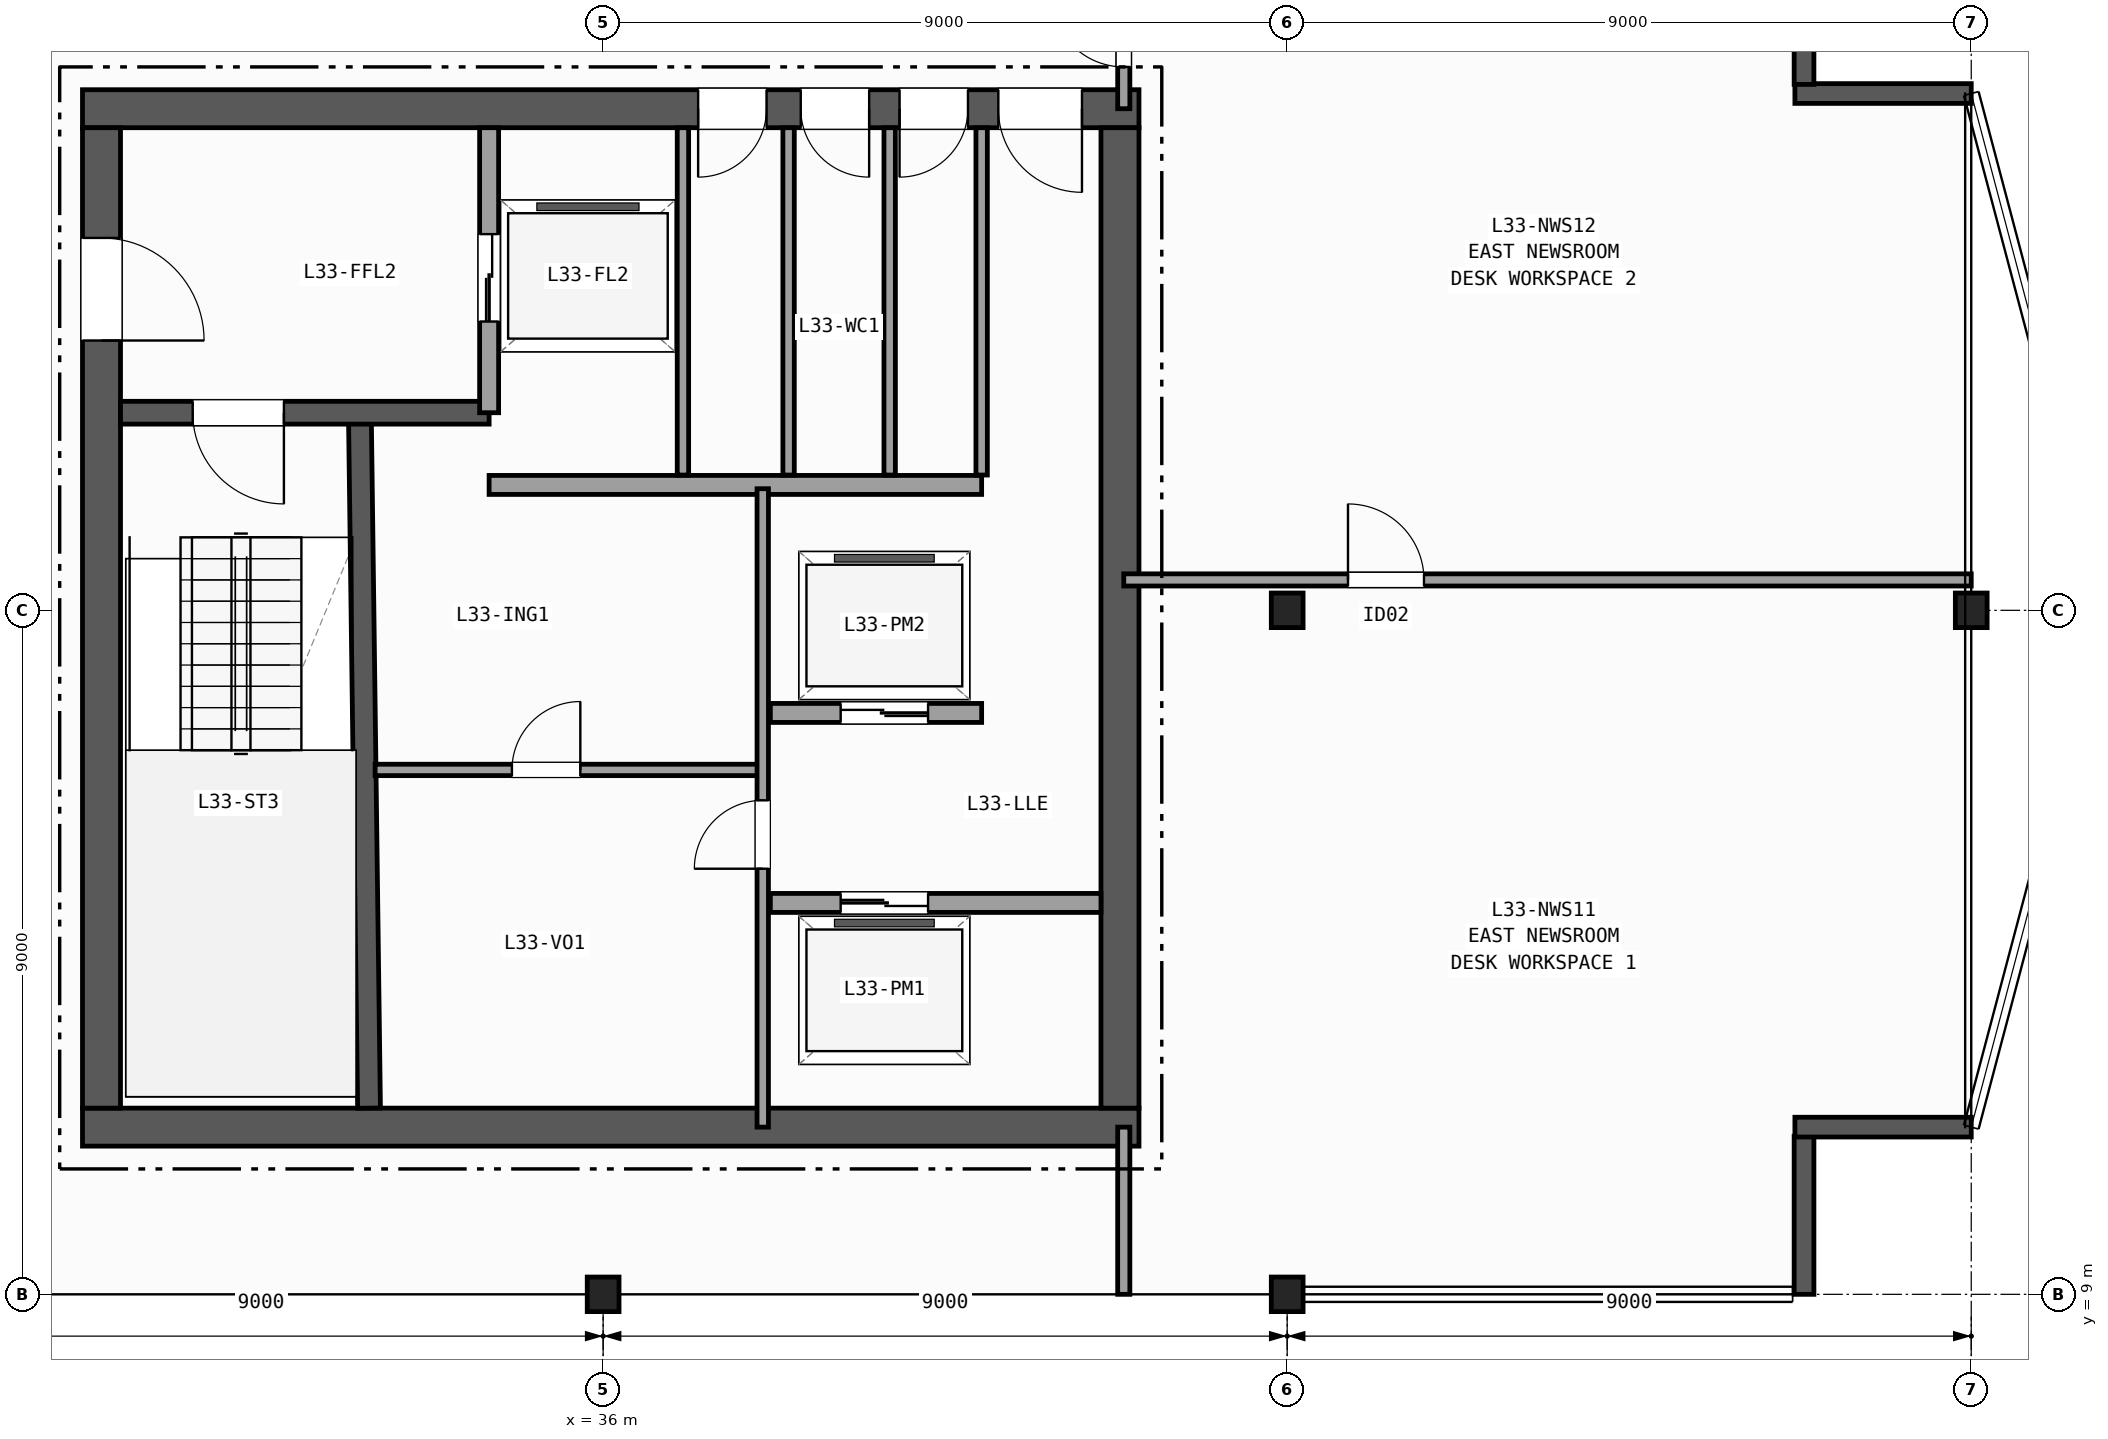
"""IFC4 building model, lengths in metres.
Left out: names, types, materials, properties, quantities, classifications, styles, units other than length and angle.
Written with IfcOpenShell. Run it as: python <this file> out.ifc"""

import sys

from ifc_helpers import new_model, si_unit, direction, frame, frame_2d, origin, origin_2d, place, context, subcontext, project, spatial, rectangle, i_section, extrude, element, fill, save


model = new_model("IFC4")
c1 = context("Model", 3, precision=1e-05, world=origin(), true_north=direction((0.0, 1.0)))
c2 = subcontext(c1, "Body", "Model", "MODEL_VIEW")
j1 = project(units=[si_unit("LENGTHUNIT", "METRE"), si_unit("PLANEANGLEUNIT", "RADIAN")], contexts=[c1])
p1 = place(None, origin())
s1 = spatial("IfcSite", under=j1, at=p1, CompositionType="ELEMENT")
p2 = place(p1, origin())
s2 = spatial("IfcBuilding", under=s1, at=p2, CompositionType="ELEMENT")
p3 = place(p2, frame((0.0, 0.0, 135.9)))
s3 = spatial("IfcBuildingStorey", under=s2, at=p3, CompositionType="ELEMENT", Elevation=135.9)
for number, where, z_axis, x_axis in (
    (1, (36.0, 9.0, 0.0), (0.0, 0.0, 1.0), (1.0, 0.0, 0.0)),
    (2, (45.0, 9.0, 0.0), (0.0, 0.0, 1.0), (1.0, 0.0, 0.0)),
    (3, (45.0, 18.0, 0.0), (0.0, 0.0, 1.0), (1.0, 0.0, 0.0)),
    (4, (54.0, 18.0, 0.0), (0.0, 0.0, 1.0), (1.0, 0.0, 0.0)),
):
    element("IfcColumn", number, at=place(p3, frame(where, z_axis=z_axis, x_axis=x_axis)), inside=s3, PredefinedType="COLUMN", context=c2, shape_type="SweptSolid", body=[
        extrude(i_section(OverallWidth=0.418, OverallDepth=0.455, WebThickness=0.042, FlangeThickness=0.068, FilletRadius=0.015, at=origin_2d()), origin(), (0.0, 0.0, 1.0), 3.7),
    ])
p4 = place(p3, frame((51.8, 9.0, 0.0), z_axis=(0.0, 0.0, 1.0), x_axis=(0.0, 1.0, 0.0)))
e5 = element("IfcWall", 5, at=p4, inside=s3, PredefinedType="SOLIDWALL", context=c2, shape_type="SweptSolid", body=[
    extrude(rectangle(XDim=2.08, YDim=0.26, at=frame_2d((1.04, 0.0))), origin(), (0.0, 0.0, 1.0), 3.42),
])
for number, where, z_axis, x_axis in (
    (6, (51.68, 11.2, 0.0), (0.0, 0.0, 1.0), (1.0, 0.0, 0.0)),
    (7, (54.0, 24.8, 0.0), (0.0, 0.0, 1.0), (-1.0, 0.0, 0.0)),
):
    element("IfcWall", number, at=place(p3, frame(where, z_axis=z_axis, x_axis=x_axis)), inside=s3, PredefinedType="SOLIDWALL", context=c2, shape_type="SweptSolid", body=[
        extrude(rectangle(XDim=2.32, YDim=0.26, at=frame_2d((1.16, 0.0))), origin(), (0.0, 0.0, 1.0), 3.42),
    ])
p5 = place(p3, frame((51.8, 24.92, 0.0), z_axis=(0.0, 0.0, 1.0), x_axis=(0.0, 1.0, 0.0)))
e8 = element("IfcWall", 8, at=p5, inside=s3, PredefinedType="SOLIDWALL", context=c2, shape_type="SweptSolid", body=[
    extrude(rectangle(XDim=2.08, YDim=0.26, at=frame_2d((1.04, 0.0))), origin(), (0.0, 0.0, 1.0), 3.42),
])
p6 = place(p3, frame((29.15, 11.2, 0.0), z_axis=(0.0, 0.0, 1.0), x_axis=(1.0, 0.0, 0.0)))
e9 = element("IfcWall", 9, at=p6, inside=s3, PredefinedType="SHEAR", context=c2, shape_type="SweptSolid", body=[
    extrude(rectangle(XDim=13.9, YDim=0.5, at=frame_2d((6.95, 0.0))), origin(), (0.0, 0.0, 1.0), 3.42),
])
p7 = place(p3, frame((43.05, 24.6, 0.0), z_axis=(0.0, 0.0, 1.0), x_axis=(-1.0, 0.0, 0.0)))
e10 = element("IfcWall", 10, at=p7, inside=s3, PredefinedType="SHEAR", context=c2, shape_type="SweptSolid", body=[
    extrude(rectangle(XDim=13.9, YDim=0.5, at=frame_2d((6.95, 0.0))), origin(), (0.0, 0.0, 1.0), 3.42),
])
p8 = place(p7, frame((0.75, 0.0, 0.0)))
e11 = element("IfcOpeningElement", 11, at=p8, cuts=e10, PredefinedType="OPENING", context=c2, shape_type="SweptSolid", body=[
    extrude(rectangle(XDim=1.1, YDim=2.15, at=frame_2d((0.55, 1.075))), frame((0.0, 0.26, 0.0), z_axis=(0.0, -1.0, 0.0), x_axis=(1.0, 0.0, 0.0)), (0.0, 0.0, 1.0), 0.52),
])
p9 = place(p7, frame((2.25, 0.0, 0.0)))
e12 = element("IfcOpeningElement", 12, at=p9, cuts=e10, PredefinedType="OPENING", context=c2, shape_type="SweptSolid", body=[
    extrude(rectangle(XDim=0.9, YDim=2.1, at=frame_2d((0.45, 1.05))), frame((0.0, 0.26, 0.0), z_axis=(0.0, -1.0, 0.0), x_axis=(1.0, 0.0, 0.0)), (0.0, 0.0, 1.0), 0.52),
])
p10 = place(p7, frame((3.55, 0.0, 0.0)))
e13 = element("IfcOpeningElement", 13, at=p10, cuts=e10, PredefinedType="OPENING", context=c2, shape_type="SweptSolid", body=[
    extrude(rectangle(XDim=0.9, YDim=2.1, at=frame_2d((0.45, 1.05))), frame((0.0, 0.26, 0.0), z_axis=(0.0, -1.0, 0.0), x_axis=(1.0, 0.0, 0.0)), (0.0, 0.0, 1.0), 0.52),
])
p11 = place(p7, frame((4.9, 0.0, 0.0)))
e14 = element("IfcOpeningElement", 14, at=p11, cuts=e10, PredefinedType="OPENING", context=c2, shape_type="SweptSolid", body=[
    extrude(rectangle(XDim=0.9, YDim=2.1, at=frame_2d((0.45, 1.05))), frame((0.0, 0.26, 0.0), z_axis=(0.0, -1.0, 0.0), x_axis=(1.0, 0.0, 0.0)), (0.0, 0.0, 1.0), 0.52),
])
p12 = place(p3, frame((29.4, 24.35, 0.0), z_axis=(0.0, 0.0, 1.0), x_axis=(0.0, -1.0, 0.0)))
e15 = element("IfcWall", 15, at=p12, inside=s3, PredefinedType="SHEAR", context=c2, shape_type="SweptSolid", body=[
    extrude(rectangle(XDim=12.9, YDim=0.5, at=frame_2d((6.45, 0.0))), origin(), (0.0, 0.0, 1.0), 3.42),
])
p13 = place(p12, frame((1.45, 0.0, 0.0)))
e16 = element("IfcOpeningElement", 16, at=p13, cuts=e15, PredefinedType="OPENING", context=c2, shape_type="SweptSolid", body=[
    extrude(rectangle(XDim=1.35, YDim=2.15, at=frame_2d((0.675, 1.075))), frame((0.0, 0.26, 0.0), z_axis=(0.0, -1.0, 0.0), x_axis=(1.0, 0.0, 0.0)), (0.0, 0.0, 1.0), 0.52),
])
p14 = place(p3, frame((42.8, 11.45, 0.0), z_axis=(0.0, 0.0, 1.0), x_axis=(0.0, 1.0, 0.0)))
e17 = element("IfcWall", 17, at=p14, inside=s3, PredefinedType="SHEAR", context=c2, shape_type="SweptSolid", body=[
    extrude(rectangle(XDim=12.9, YDim=0.5, at=frame_2d((6.45, 0.0))), origin(), (0.0, 0.0, 1.0), 3.42),
])
p15 = place(p3, frame((32.92, 11.45, 0.0), z_axis=(0.0, 0.0, 1.0), x_axis=(-0.013171578211, 0.999913251001, 0.0)))
e18 = element("IfcWall", 18, at=p15, inside=s3, PredefinedType="SHEAR", context=c2, shape_type="SweptSolid", body=[
    extrude(rectangle(XDim=9.101, YDim=0.3, at=frame_2d((4.55, 0.0))), origin(), (0.0, 0.0, 1.0), 3.42),
])
p16 = place(p3, frame((34.5, 20.6, 0.0), z_axis=(0.0, 0.0, 1.0), x_axis=(-1.0, 0.0, 0.0)))
e19 = element("IfcWall", 19, at=p16, inside=s3, PredefinedType="SHEAR", context=c2, shape_type="SweptSolid", body=[
    extrude(rectangle(XDim=4.85, YDim=0.3, at=frame_2d((2.425, 0.0))), origin(), (0.0, 0.0, 1.0), 3.42),
])
p17 = place(p16, frame((2.7, 0.0, 0.0)))
e20 = element("IfcOpeningElement", 20, at=p17, cuts=e19, PredefinedType="OPENING", context=c2, shape_type="SweptSolid", body=[
    extrude(rectangle(XDim=1.2, YDim=2.15, at=frame_2d((0.6, 1.075))), frame((0.0, 0.16, 0.0), z_axis=(0.0, -1.0, 0.0), x_axis=(1.0, 0.0, 0.0)), (0.0, 0.0, 1.0), 0.32),
])
p18 = place(p3, frame((34.5, 20.6, 0.0), z_axis=(0.0, 0.0, 1.0), x_axis=(0.0, 1.0, 0.0)))
e21 = element("IfcWall", 21, at=p18, inside=s3, PredefinedType="PARTITIONING", context=c2, shape_type="SweptSolid", body=[
    extrude(rectangle(XDim=3.75, YDim=0.25, at=frame_2d((1.875, 0.0))), origin(), (0.0, 0.0, 1.0), 3.42),
])
p19 = place(p18, frame((1.2, 0.0, 0.0)))
e22 = element("IfcOpeningElement", 22, at=p19, cuts=e21, PredefinedType="OPENING", context=c2, shape_type="SweptSolid", body=[
    extrude(rectangle(XDim=1.15, YDim=2.15, at=frame_2d((0.575, 1.075))), frame((0.0, 0.135, 0.0), z_axis=(0.0, -1.0, 0.0), x_axis=(1.0, 0.0, 0.0)), (0.0, 0.0, 1.0), 0.27),
])
p20 = place(p3, frame((34.5, 19.65, 0.0), z_axis=(0.0, 0.0, 1.0), x_axis=(1.0, 0.0, 0.0)))
e23 = element("IfcWall", 23, at=p20, inside=s3, PredefinedType="PARTITIONING", context=c2, shape_type="SweptSolid", body=[
    extrude(rectangle(XDim=6.48, YDim=0.25, at=frame_2d((3.24, 0.0))), origin(), (0.0, 0.0, 1.0), 3.42),
])
p21 = place(p3, frame((38.2, 14.15, 0.0), z_axis=(0.0, 0.0, 1.0), x_axis=(1.0, 0.0, 0.0)))
e24 = element("IfcWall", 24, at=p21, inside=s3, PredefinedType="PARTITIONING", context=c2, shape_type="SweptSolid", body=[
    extrude(rectangle(XDim=4.35, YDim=0.25, at=frame_2d((2.175, 0.0))), origin(), (0.0, 0.0, 1.0), 3.42),
])
p22 = place(p21, frame((0.925, 0.0, 0.0)))
e25 = element("IfcOpeningElement", 25, at=p22, cuts=e24, PredefinedType="OPENING", context=c2, shape_type="SweptSolid", body=[
    extrude(rectangle(XDim=1.15, YDim=2.15, at=frame_2d((0.575, 1.075))), frame((0.0, 0.135, 0.0), z_axis=(0.0, -1.0, 0.0), x_axis=(1.0, 0.0, 0.0)), (0.0, 0.0, 1.0), 0.27),
])
p23 = place(p3, frame((40.98, 16.65, 0.0), z_axis=(0.0, 0.0, 1.0), x_axis=(-1.0, 0.0, 0.0)))
e26 = element("IfcWall", 26, at=p23, inside=s3, PredefinedType="PARTITIONING", context=c2, shape_type="SweptSolid", body=[
    extrude(rectangle(XDim=2.78, YDim=0.25, at=frame_2d((1.39, 0.0))), origin(), (0.0, 0.0, 1.0), 3.42),
])
p24 = place(p23, frame((0.705, 0.0, 0.0)))
e27 = element("IfcOpeningElement", 27, at=p24, cuts=e26, PredefinedType="OPENING", context=c2, shape_type="SweptSolid", body=[
    extrude(rectangle(XDim=1.15, YDim=2.15, at=frame_2d((0.575, 1.075))), frame((0.0, 0.135, 0.0), z_axis=(0.0, -1.0, 0.0), x_axis=(1.0, 0.0, 0.0)), (0.0, 0.0, 1.0), 0.27),
])
p25 = place(p3, frame((33.0, 15.9, 0.0), z_axis=(0.0, 0.0, 1.0), x_axis=(1.0, 0.0, 0.0)))
e28 = element("IfcWall", 28, at=p25, inside=s3, PredefinedType="PARTITIONING", context=c2, shape_type="SweptSolid", body=[
    extrude(rectangle(XDim=5.1, YDim=0.15, at=frame_2d((2.55, 0.0))), origin(), (0.0, 0.0, 1.0), 3.42),
])
p26 = place(p25, frame((1.8, 0.0, 0.0)))
e29 = element("IfcOpeningElement", 29, at=p26, cuts=e28, PredefinedType="OPENING", context=c2, shape_type="SweptSolid", body=[
    extrude(rectangle(XDim=0.9, YDim=2.1, at=frame_2d((0.45, 1.05))), frame((0.0, 0.085, 0.0), z_axis=(0.0, -1.0, 0.0), x_axis=(1.0, 0.0, 0.0)), (0.0, 0.0, 1.0), 0.17),
])
p27 = place(p3, frame((38.1, 11.2, 0.0), z_axis=(0.0, 0.0, 1.0), x_axis=(0.0, 1.0, 0.0)))
e30 = element("IfcWall", 30, at=p27, inside=s3, PredefinedType="PARTITIONING", context=c2, shape_type="SweptSolid", body=[
    extrude(rectangle(XDim=8.4, YDim=0.15, at=frame_2d((4.2, 0.0))), origin(), (0.0, 0.0, 1.0), 3.42),
])
p28 = place(p27, frame((3.4, 0.0, 0.0)))
e31 = element("IfcOpeningElement", 31, at=p28, cuts=e30, PredefinedType="OPENING", context=c2, shape_type="SweptSolid", body=[
    extrude(rectangle(XDim=0.9, YDim=2.1, at=frame_2d((0.45, 1.05))), frame((0.0, 0.085, 0.0), z_axis=(0.0, -1.0, 0.0), x_axis=(1.0, 0.0, 0.0)), (0.0, 0.0, 1.0), 0.17),
])
for number, where, z_axis, x_axis in (
    (32, (37.05, 19.78, 0.0), (0.0, 0.0, 1.0), (0.0, 1.0, 0.0)),
    (33, (38.44, 19.78, 0.0), (0.0, 0.0, 1.0), (0.0, 1.0, 0.0)),
    (34, (39.77, 19.78, 0.0), (0.0, 0.0, 1.0), (0.0, 1.0, 0.0)),
    (35, (40.98, 19.78, 0.0), (0.0, 0.0, 1.0), (0.0, 1.0, 0.0)),
):
    element("IfcWall", number, at=place(p3, frame(where, z_axis=z_axis, x_axis=x_axis)), inside=s3, PredefinedType="PARTITIONING", context=c2, shape_type="SweptSolid", body=[
        extrude(rectangle(XDim=4.57, YDim=0.15, at=frame_2d((2.285, 0.0))), origin(), (0.0, 0.0, 1.0), 3.42),
    ])
p29 = place(p3, frame((42.85, 9.0, 0.0), z_axis=(0.0, 0.0, 1.0), x_axis=(0.0, 1.0, 0.0)))
e36 = element("IfcWall", 36, at=p29, inside=s3, PredefinedType="PARTITIONING", context=c2, shape_type="SweptSolid", body=[
    extrude(rectangle(XDim=2.2, YDim=0.16, at=frame_2d((1.1, 0.0))), origin(), (0.0, 0.0, 1.0), 2.634),
])
p30 = place(p3, frame((42.85, 24.6, 0.0), z_axis=(0.0, 0.0, 1.0), x_axis=(0.0, 1.0, 0.0)))
e37 = element("IfcWall", 37, at=p30, inside=s3, PredefinedType="PARTITIONING", context=c2, shape_type="SweptSolid", body=[
    extrude(rectangle(XDim=2.4, YDim=0.16, at=frame_2d((1.2, 0.0))), origin(), (0.0, 0.0, 1.0), 2.634),
])
p31 = place(p30, frame((0.55, 0.0, 0.0)))
e38 = element("IfcOpeningElement", 38, at=p31, cuts=e37, PredefinedType="OPENING", context=c2, shape_type="SweptSolid", body=[
    extrude(rectangle(XDim=0.95, YDim=2.1, at=frame_2d((0.475, 1.05))), frame((0.0, 0.09, 0.0), z_axis=(0.0, -1.0, 0.0), x_axis=(1.0, 0.0, 0.0)), (0.0, 0.0, 1.0), 0.18),
])
p32 = place(p3, frame((42.85, 18.4, 0.0), z_axis=(0.0, 0.0, 1.0), x_axis=(1.0, 0.0, 0.0)))
e39 = element("IfcWall", 39, at=p32, inside=s3, PredefinedType="PARTITIONING", context=c2, shape_type="SweptSolid", body=[
    extrude(rectangle(XDim=11.15, YDim=0.16, at=frame_2d((5.575, 0.0))), origin(), (0.0, 0.0, 1.0), 3.42),
])
p33 = place(p32, frame((2.95, 0.0, 0.0)))
e40 = element("IfcOpeningElement", 40, at=p33, cuts=e39, PredefinedType="OPENING", context=c2, shape_type="SweptSolid", body=[
    extrude(rectangle(XDim=1.0, YDim=2.1, at=frame_2d((0.5, 1.05))), frame((0.0, 0.09, 0.0), z_axis=(0.0, -1.0, 0.0), x_axis=(1.0, 0.0, 0.0)), (0.0, 0.0, 1.0), 0.18),
])
p34 = place(p17, origin())
e41 = element("IfcDoor", 41, at=p34, inside=s3, OperationType="SINGLE_SWING_LEFT", PredefinedType="DOOR", context=c2, shape_type="SweptSolid", body=[
    extrude(rectangle(XDim=1.2, YDim=2.15, at=frame_2d((0.6, 1.075))), frame((0.0, 0.025, 0.0), z_axis=(0.0, -1.0, 0.0), x_axis=(1.0, 0.0, 0.0)), (0.0, 0.0, 1.0), 0.05),
])
fill(e20, e41)
p35 = place(p13, origin())
e42 = element("IfcDoor", 42, at=p35, inside=s3, OperationType="SINGLE_SWING_RIGHT", PredefinedType="DOOR", context=c2, shape_type="SweptSolid", body=[
    extrude(rectangle(XDim=1.35, YDim=2.15, at=frame_2d((0.675, 1.075))), frame((0.0, 0.025, 0.0), z_axis=(0.0, -1.0, 0.0), x_axis=(1.0, 0.0, 0.0)), (0.0, 0.0, 1.0), 0.05),
])
fill(e16, e42)
p36 = place(p8, origin())
e43 = element("IfcDoor", 43, at=p36, inside=s3, OperationType="SINGLE_SWING_LEFT", PredefinedType="DOOR", context=c2, shape_type="SweptSolid", body=[
    extrude(rectangle(XDim=1.1, YDim=2.15, at=frame_2d((0.55, 1.075))), frame((0.0, 0.025, 0.0), z_axis=(0.0, -1.0, 0.0), x_axis=(1.0, 0.0, 0.0)), (0.0, 0.0, 1.0), 0.05),
])
fill(e11, e43)
p37 = place(p9, origin())
e44 = element("IfcDoor", 44, at=p37, inside=s3, OperationType="SINGLE_SWING_RIGHT", PredefinedType="DOOR", context=c2, shape_type="SweptSolid", body=[
    extrude(rectangle(XDim=0.9, YDim=2.1, at=frame_2d((0.45, 1.05))), frame((0.0, 0.025, 0.0), z_axis=(0.0, -1.0, 0.0), x_axis=(1.0, 0.0, 0.0)), (0.0, 0.0, 1.0), 0.05),
])
fill(e12, e44)
p38 = place(p10, origin())
e45 = element("IfcDoor", 45, at=p38, inside=s3, OperationType="SINGLE_SWING_LEFT", PredefinedType="DOOR", context=c2, shape_type="SweptSolid", body=[
    extrude(rectangle(XDim=0.9, YDim=2.1, at=frame_2d((0.45, 1.05))), frame((0.0, 0.025, 0.0), z_axis=(0.0, -1.0, 0.0), x_axis=(1.0, 0.0, 0.0)), (0.0, 0.0, 1.0), 0.05),
])
fill(e13, e45)
p39 = place(p11, origin())
e46 = element("IfcDoor", 46, at=p39, inside=s3, OperationType="SINGLE_SWING_RIGHT", PredefinedType="DOOR", context=c2, shape_type="SweptSolid", body=[
    extrude(rectangle(XDim=0.9, YDim=2.1, at=frame_2d((0.45, 1.05))), frame((0.0, 0.025, 0.0), z_axis=(0.0, -1.0, 0.0), x_axis=(1.0, 0.0, 0.0)), (0.0, 0.0, 1.0), 0.05),
])
fill(e14, e46)
p40 = place(p19, origin())
e47 = element("IfcDoor", 47, at=p40, inside=s3, OperationType="DOUBLE_DOOR_SLIDING", PredefinedType="DOOR", context=c2, shape_type="SweptSolid", body=[
    extrude(rectangle(XDim=1.15, YDim=2.15, at=frame_2d((0.575, 1.075))), frame((0.0, 0.025, 0.0), z_axis=(0.0, -1.0, 0.0), x_axis=(1.0, 0.0, 0.0)), (0.0, 0.0, 1.0), 0.05),
])
fill(e22, e47)
p41 = place(p22, origin())
e48 = element("IfcDoor", 48, at=p41, inside=s3, OperationType="DOUBLE_DOOR_SLIDING", PredefinedType="DOOR", context=c2, shape_type="SweptSolid", body=[
    extrude(rectangle(XDim=1.15, YDim=2.15, at=frame_2d((0.575, 1.075))), frame((0.0, 0.025, 0.0), z_axis=(0.0, -1.0, 0.0), x_axis=(1.0, 0.0, 0.0)), (0.0, 0.0, 1.0), 0.05),
])
fill(e25, e48)
p42 = place(p24, origin())
e49 = element("IfcDoor", 49, at=p42, inside=s3, OperationType="DOUBLE_DOOR_SLIDING", PredefinedType="DOOR", context=c2, shape_type="SweptSolid", body=[
    extrude(rectangle(XDim=1.15, YDim=2.15, at=frame_2d((0.575, 1.075))), frame((0.0, 0.025, 0.0), z_axis=(0.0, -1.0, 0.0), x_axis=(1.0, 0.0, 0.0)), (0.0, 0.0, 1.0), 0.05),
])
fill(e27, e49)
p43 = place(p28, origin())
e50 = element("IfcDoor", 50, at=p43, inside=s3, OperationType="SINGLE_SWING_LEFT", PredefinedType="DOOR", context=c2, shape_type="SweptSolid", body=[
    extrude(rectangle(XDim=0.9, YDim=2.1, at=frame_2d((0.45, 1.05))), frame((0.0, 0.025, 0.0), z_axis=(0.0, -1.0, 0.0), x_axis=(1.0, 0.0, 0.0)), (0.0, 0.0, 1.0), 0.05),
])
fill(e31, e50)
p44 = place(p26, origin())
e51 = element("IfcDoor", 51, at=p44, inside=s3, OperationType="SINGLE_SWING_RIGHT", PredefinedType="DOOR", context=c2, shape_type="SweptSolid", body=[
    extrude(rectangle(XDim=0.9, YDim=2.1, at=frame_2d((0.45, 1.05))), frame((0.0, 0.025, 0.0), z_axis=(0.0, -1.0, 0.0), x_axis=(1.0, 0.0, 0.0)), (0.0, 0.0, 1.0), 0.05),
])
fill(e29, e51)
p45 = place(p31, origin())
e52 = element("IfcDoor", 52, at=p45, inside=s3, OperationType="SINGLE_SWING_RIGHT", PredefinedType="DOOR", context=c2, shape_type="SweptSolid", body=[
    extrude(rectangle(XDim=0.95, YDim=2.1, at=frame_2d((0.475, 1.05))), frame((0.0, 0.025, 0.0), z_axis=(0.0, -1.0, 0.0), x_axis=(1.0, 0.0, 0.0)), (0.0, 0.0, 1.0), 0.05),
])
fill(e38, e52)
p46 = place(p33, origin())
e53 = element("IfcDoor", 53, at=p46, inside=s3, OperationType="SINGLE_SWING_LEFT", PredefinedType="DOOR", context=c2, shape_type="SweptSolid", body=[
    extrude(rectangle(XDim=1.0, YDim=2.1, at=frame_2d((0.5, 1.05))), frame((0.0, 0.025, 0.0), z_axis=(0.0, -1.0, 0.0), x_axis=(1.0, 0.0, 0.0)), (0.0, 0.0, 1.0), 0.05),
])
fill(e40, e53)
save(model, sys.argv[1])
